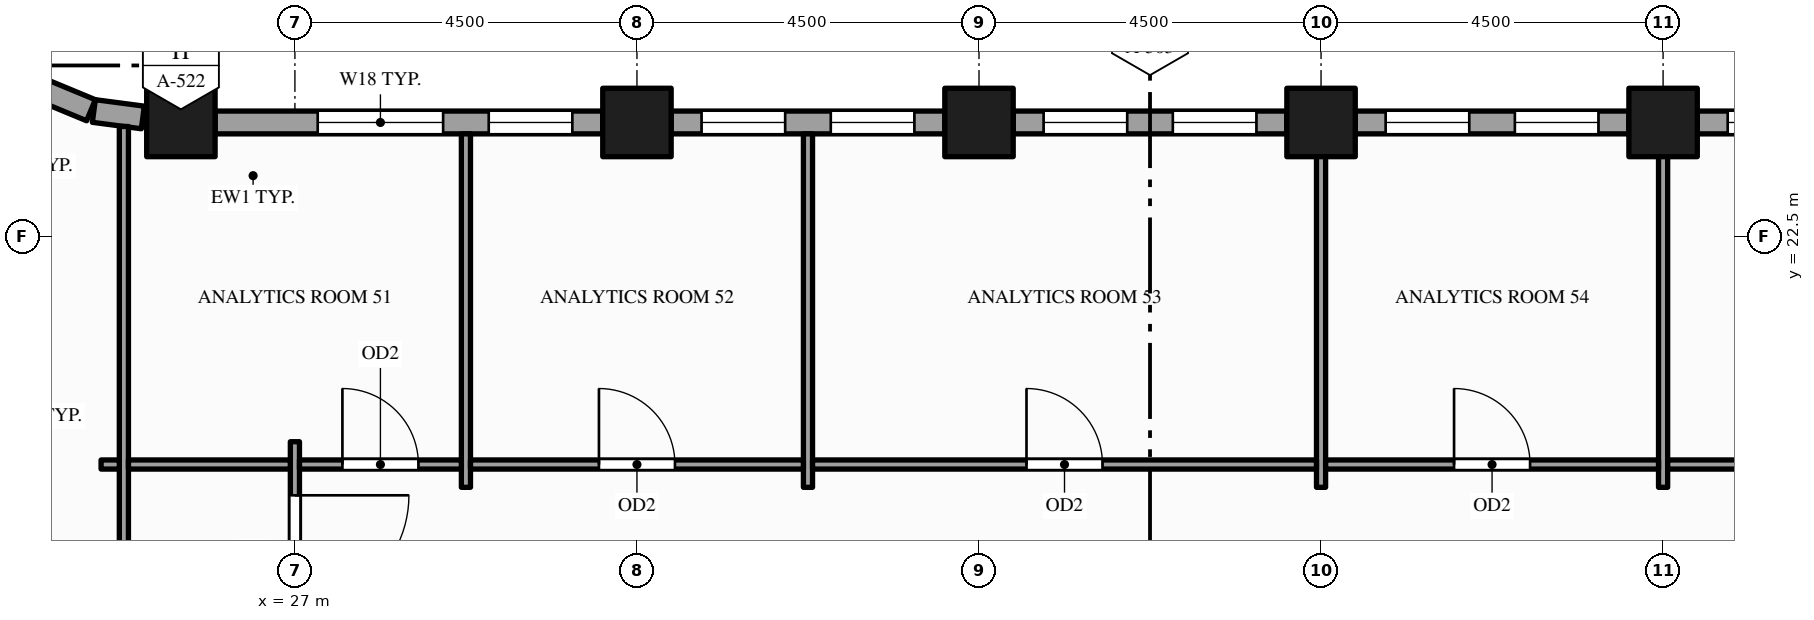
"""IFC4 building model, lengths in metres.
Left out: names, types, materials, properties, quantities, classifications, styles, units other than length and angle.
Written with IfcOpenShell. Run it as: python <this file> out.ifc"""

import sys

from ifc_helpers import new_model, si_unit, direction, frame, frame_2d, origin, origin_2d, place, context, subcontext, project, spatial, rectangle, hollow_rectangle, extrude, element, fill, save


model = new_model("IFC4")
c1 = context("Model", 3, precision=1e-05, world=origin(), true_north=direction((0.0, 1.0)))
c2 = subcontext(c1, "Body", "Model", "MODEL_VIEW")
j1 = project(units=[si_unit("LENGTHUNIT", "METRE"), si_unit("PLANEANGLEUNIT", "RADIAN")], contexts=[c1])
p1 = place(None, origin())
s1 = spatial("IfcSite", under=j1, at=p1, CompositionType="ELEMENT")
p2 = place(p1, origin())
s2 = spatial("IfcBuilding", under=s1, at=p2, CompositionType="ELEMENT")
p3 = place(p2, frame((0.0, 0.0, 159.0)))
s3 = spatial("IfcBuildingStorey", under=s2, at=p3, CompositionType="ELEMENT", Elevation=159.0)
for number, where, z_axis, x_axis in (
    (1, (25.5, 24.0, -0.15), (0.0, 0.0, 1.0), (1.0, 0.0, 0.0)),
    (2, (31.5, 24.0, -0.15), (0.0, 0.0, 1.0), (1.0, 0.0, 0.0)),
    (3, (36.0, 24.0, -0.15), (0.0, 0.0, 1.0), (1.0, 0.0, 0.0)),
    (4, (40.5, 24.0, -0.15), (0.0, 0.0, 1.0), (1.0, 0.0, 0.0)),
    (5, (45.0, 24.0, -0.15), (0.0, 0.0, 1.0), (1.0, 0.0, 0.0)),
):
    element("IfcColumn", number, at=place(p3, frame(where, z_axis=z_axis, x_axis=x_axis)), inside=s3, PredefinedType="COLUMN", context=c2, shape_type="SweptSolid", body=[
        extrude(hollow_rectangle(XDim=0.9, YDim=0.9, WallThickness=0.045, at=origin_2d()), origin(), (0.0, 0.0, 1.0), 4.0),
    ])
p4 = place(p3, frame((49.05, 24.0, 0.0), z_axis=(0.0, 0.0, 1.0), x_axis=(-1.0, 0.0, 0.0)))
e6 = element("IfcWall", 6, at=p4, inside=s3, PredefinedType="STANDARD", context=c2, shape_type="SweptSolid", body=[
    extrude(rectangle(XDim=3.6, YDim=0.3, at=frame_2d((1.8, 0.0))), origin(), (0.0, 0.0, 1.0), 2.87),
])
p5 = place(p4, frame((0.4, 0.0, 0.9)))
e7 = element("IfcOpeningElement", 7, at=p5, cuts=e6, PredefinedType="OPENING", context=c2, shape_type="SweptSolid", body=[
    extrude(rectangle(XDim=1.1, YDim=1.75, at=frame_2d((0.55, 0.875))), frame((0.0, 0.16, 0.0), z_axis=(0.0, -1.0, 0.0), x_axis=(1.0, 0.0, 0.0)), (0.0, 0.0, 1.0), 0.32),
])
p6 = place(p4, frame((2.1, 0.0, 0.9)))
e8 = element("IfcOpeningElement", 8, at=p6, cuts=e6, PredefinedType="OPENING", context=c2, shape_type="SweptSolid", body=[
    extrude(rectangle(XDim=1.1, YDim=1.75, at=frame_2d((0.55, 0.875))), frame((0.0, 0.16, 0.0), z_axis=(0.0, -1.0, 0.0), x_axis=(1.0, 0.0, 0.0)), (0.0, 0.0, 1.0), 0.32),
])
p7 = place(p3, frame((44.55, 24.0, 0.0), z_axis=(0.0, 0.0, 1.0), x_axis=(-1.0, 0.0, 0.0)))
e9 = element("IfcWall", 9, at=p7, inside=s3, PredefinedType="STANDARD", context=c2, shape_type="SweptSolid", body=[
    extrude(rectangle(XDim=3.6, YDim=0.3, at=frame_2d((1.8, 0.0))), origin(), (0.0, 0.0, 1.0), 2.87),
])
p8 = place(p7, frame((0.4, 0.0, 0.9)))
e10 = element("IfcOpeningElement", 10, at=p8, cuts=e9, PredefinedType="OPENING", context=c2, shape_type="SweptSolid", body=[
    extrude(rectangle(XDim=1.1, YDim=1.75, at=frame_2d((0.55, 0.875))), frame((0.0, 0.16, 0.0), z_axis=(0.0, -1.0, 0.0), x_axis=(1.0, 0.0, 0.0)), (0.0, 0.0, 1.0), 0.32),
])
p9 = place(p7, frame((2.1, 0.0, 0.9)))
e11 = element("IfcOpeningElement", 11, at=p9, cuts=e9, PredefinedType="OPENING", context=c2, shape_type="SweptSolid", body=[
    extrude(rectangle(XDim=1.1, YDim=1.75, at=frame_2d((0.55, 0.875))), frame((0.0, 0.16, 0.0), z_axis=(0.0, -1.0, 0.0), x_axis=(1.0, 0.0, 0.0)), (0.0, 0.0, 1.0), 0.32),
])
p10 = place(p3, frame((40.05, 24.0, 0.0), z_axis=(0.0, 0.0, 1.0), x_axis=(-1.0, 0.0, 0.0)))
e12 = element("IfcWall", 12, at=p10, inside=s3, PredefinedType="STANDARD", context=c2, shape_type="SweptSolid", body=[
    extrude(rectangle(XDim=3.6, YDim=0.3, at=frame_2d((1.8, 0.0))), origin(), (0.0, 0.0, 1.0), 2.87),
])
p11 = place(p10, frame((0.4, 0.0, 0.9)))
e13 = element("IfcOpeningElement", 13, at=p11, cuts=e12, PredefinedType="OPENING", context=c2, shape_type="SweptSolid", body=[
    extrude(rectangle(XDim=1.1, YDim=1.75, at=frame_2d((0.55, 0.875))), frame((0.0, 0.16, 0.0), z_axis=(0.0, -1.0, 0.0), x_axis=(1.0, 0.0, 0.0)), (0.0, 0.0, 1.0), 0.32),
])
p12 = place(p10, frame((2.1, 0.0, 0.9)))
e14 = element("IfcOpeningElement", 14, at=p12, cuts=e12, PredefinedType="OPENING", context=c2, shape_type="SweptSolid", body=[
    extrude(rectangle(XDim=1.1, YDim=1.75, at=frame_2d((0.55, 0.875))), frame((0.0, 0.16, 0.0), z_axis=(0.0, -1.0, 0.0), x_axis=(1.0, 0.0, 0.0)), (0.0, 0.0, 1.0), 0.32),
])
p13 = place(p3, frame((35.55, 24.0, 0.0), z_axis=(0.0, 0.0, 1.0), x_axis=(-1.0, 0.0, 0.0)))
e15 = element("IfcWall", 15, at=p13, inside=s3, PredefinedType="STANDARD", context=c2, shape_type="SweptSolid", body=[
    extrude(rectangle(XDim=3.6, YDim=0.3, at=frame_2d((1.8, 0.0))), origin(), (0.0, 0.0, 1.0), 2.87),
])
p14 = place(p13, frame((0.4, 0.0, 0.9)))
e16 = element("IfcOpeningElement", 16, at=p14, cuts=e15, PredefinedType="OPENING", context=c2, shape_type="SweptSolid", body=[
    extrude(rectangle(XDim=1.1, YDim=1.75, at=frame_2d((0.55, 0.875))), frame((0.0, 0.16, 0.0), z_axis=(0.0, -1.0, 0.0), x_axis=(1.0, 0.0, 0.0)), (0.0, 0.0, 1.0), 0.32),
])
p15 = place(p13, frame((2.1, 0.0, 0.9)))
e17 = element("IfcOpeningElement", 17, at=p15, cuts=e15, PredefinedType="OPENING", context=c2, shape_type="SweptSolid", body=[
    extrude(rectangle(XDim=1.1, YDim=1.75, at=frame_2d((0.55, 0.875))), frame((0.0, 0.16, 0.0), z_axis=(0.0, -1.0, 0.0), x_axis=(1.0, 0.0, 0.0)), (0.0, 0.0, 1.0), 0.32),
])
p16 = place(p3, frame((31.05, 24.0, 0.0), z_axis=(0.0, 0.0, 1.0), x_axis=(-1.0, 0.0, 0.0)))
e18 = element("IfcWall", 18, at=p16, inside=s3, PredefinedType="STANDARD", context=c2, shape_type="SweptSolid", body=[
    extrude(rectangle(XDim=5.1, YDim=0.3, at=frame_2d((2.55, 0.0))), origin(), (0.0, 0.0, 1.0), 2.87),
])
p17 = place(p16, frame((0.4, 0.0, 0.9)))
e19 = element("IfcOpeningElement", 19, at=p17, cuts=e18, PredefinedType="OPENING", context=c2, shape_type="SweptSolid", body=[
    extrude(rectangle(XDim=1.1, YDim=1.75, at=frame_2d((0.55, 0.875))), frame((0.0, 0.16, 0.0), z_axis=(0.0, -1.0, 0.0), x_axis=(1.0, 0.0, 0.0)), (0.0, 0.0, 1.0), 0.32),
])
p18 = place(p16, frame((2.1, 0.0, 0.9)))
e20 = element("IfcOpeningElement", 20, at=p18, cuts=e18, PredefinedType="OPENING", context=c2, shape_type="SweptSolid", body=[
    extrude(rectangle(XDim=1.65, YDim=1.75, at=frame_2d((0.825, 0.875))), frame((0.0, 0.16, 0.0), z_axis=(0.0, -1.0, 0.0), x_axis=(1.0, 0.0, 0.0)), (0.0, 0.0, 1.0), 0.32),
])
p19 = place(p3, frame((25.0, 24.066, 0.0), z_axis=(0.0, 0.0, 1.0), x_axis=(-0.991423590996, 0.130687655177, 0.0)))
e21 = element("IfcWall", 21, at=p19, inside=s3, PredefinedType="STANDARD", context=c2, shape_type="SweptSolid", body=[
    extrude(rectangle(XDim=0.65, YDim=0.3, at=frame_2d((0.325, 0.0))), origin(), (0.0, 0.0, 1.0), 2.87),
])
p20 = place(p3, frame((24.317, 24.161, 0.0), z_axis=(0.0, 0.0, 1.0), x_axis=(-0.923914616768, 0.382598720491, 0.0)))
e22 = element("IfcWall", 22, at=p20, inside=s3, PredefinedType="STANDARD", context=c2, shape_type="SweptSolid", body=[
    extrude(rectangle(XDim=1.135, YDim=0.3, at=frame_2d((0.568, 0.0))), origin(), (0.0, 0.0, 1.0), 3.149),
])
p21 = place(p3, frame((24.75, 1.65, 0.0), z_axis=(0.0, 0.0, 1.0), x_axis=(0.0, 1.0, 0.0)))
e23 = element("IfcWall", 23, at=p21, inside=s3, PredefinedType="PARTITIONING", context=c2, shape_type="SweptSolid", body=[
    extrude(rectangle(XDim=22.298, YDim=0.12, at=frame_2d((11.149, 0.0))), origin(), (0.0, 0.0, 1.0), 2.87),
])
p22 = place(p21, frame((7.725, 0.0, 0.0)))
e24 = element("IfcOpeningElement", 24, at=p22, cuts=e23, PredefinedType="OPENING", context=c2, shape_type="SweptSolid", body=[
    extrude(rectangle(XDim=1.5, YDim=2.1, at=frame_2d((0.75, 1.05))), frame((0.0, 0.07, 0.0), z_axis=(0.0, -1.0, 0.0), x_axis=(1.0, 0.0, 0.0)), (0.0, 0.0, 1.0), 0.14),
])
p23 = place(p21, frame((13.125, 0.0, 0.0)))
e25 = element("IfcOpeningElement", 25, at=p23, cuts=e23, PredefinedType="OPENING", context=c2, shape_type="SweptSolid", body=[
    extrude(rectangle(XDim=1.2, YDim=2.1, at=frame_2d((0.6, 1.05))), frame((0.0, 0.07, 0.0), z_axis=(0.0, -1.0, 0.0), x_axis=(1.0, 0.0, 0.0)), (0.0, 0.0, 1.0), 0.14),
])
p24 = place(p3, frame((27.0, 5.7, 0.0), z_axis=(0.0, 0.0, 1.0), x_axis=(0.0, 1.0, 0.0)))
e26 = element("IfcWall", 26, at=p24, inside=s3, PredefinedType="PARTITIONING", context=c2, shape_type="SweptSolid", body=[
    extrude(rectangle(XDim=14.1, YDim=0.12, at=frame_2d((7.05, 0.0))), origin(), (0.0, 0.0, 1.0), 2.87),
])
p25 = place(p24, frame((0.705, 0.0, 0.0)))
e27 = element("IfcOpeningElement", 27, at=p25, cuts=e26, PredefinedType="OPENING", context=c2, shape_type="SweptSolid", body=[
    extrude(rectangle(XDim=1.5, YDim=2.1, at=frame_2d((0.75, 1.05))), frame((0.0, 0.07, 0.0), z_axis=(0.0, -1.0, 0.0), x_axis=(1.0, 0.0, 0.0)), (0.0, 0.0, 1.0), 0.14),
])
p26 = place(p24, frame((11.895, 0.0, 0.0)))
e28 = element("IfcOpeningElement", 28, at=p26, cuts=e26, PredefinedType="OPENING", context=c2, shape_type="SweptSolid", body=[
    extrude(rectangle(XDim=1.5, YDim=2.1, at=frame_2d((0.75, 1.05))), frame((0.0, 0.07, 0.0), z_axis=(0.0, -1.0, 0.0), x_axis=(1.0, 0.0, 0.0)), (0.0, 0.0, 1.0), 0.14),
])
for number, where, z_axis, x_axis in (
    (29, (29.25, 19.2, 0.0), (0.0, 0.0, 1.0), (0.0, 1.0, 0.0)),
    (30, (33.75, 19.2, 0.0), (0.0, 0.0, 1.0), (0.0, 1.0, 0.0)),
    (31, (40.5, 19.2, 0.0), (0.0, 0.0, 1.0), (0.0, 1.0, 0.0)),
    (32, (45.0, 19.2, 0.0), (0.0, 0.0, 1.0), (0.0, 1.0, 0.0)),
):
    element("IfcWall", number, at=place(p3, frame(where, z_axis=z_axis, x_axis=x_axis)), inside=s3, PredefinedType="PARTITIONING", context=c2, shape_type="SweptSolid", body=[
        extrude(rectangle(XDim=4.65, YDim=0.12, at=frame_2d((2.325, 0.0))), origin(), (0.0, 0.0, 1.0), 2.87),
    ])
p27 = place(p3, frame((24.45, 19.5, 0.0), z_axis=(0.0, 0.0, 1.0), x_axis=(1.0, 0.0, 0.0)))
e33 = element("IfcWall", 33, at=p27, inside=s3, PredefinedType="PARTITIONING", context=c2, shape_type="SweptSolid", body=[
    extrude(rectangle(XDim=0.24, YDim=0.12, at=frame_2d((0.12, 0.0))), origin(), (0.0, 0.0, 1.0), 2.87),
])
p28 = place(p3, frame((24.81, 19.5, 0.0), z_axis=(0.0, 0.0, 1.0), x_axis=(1.0, 0.0, 0.0)))
e34 = element("IfcWall", 34, at=p28, inside=s3, PredefinedType="PARTITIONING", context=c2, shape_type="SweptSolid", body=[
    extrude(rectangle(XDim=2.13, YDim=0.12, at=frame_2d((1.065, 0.0))), origin(), (0.0, 0.0, 1.0), 2.87),
])
p29 = place(p3, frame((27.06, 19.5, 0.0), z_axis=(0.0, 0.0, 1.0), x_axis=(1.0, 0.0, 0.0)))
e35 = element("IfcWall", 35, at=p29, inside=s3, PredefinedType="PARTITIONING", context=c2, shape_type="SweptSolid", body=[
    extrude(rectangle(XDim=2.13, YDim=0.12, at=frame_2d((1.065, 0.0))), origin(), (0.0, 0.0, 1.0), 2.87),
])
p30 = place(p29, frame((0.565, 0.0, 0.0)))
e36 = element("IfcOpeningElement", 36, at=p30, cuts=e35, PredefinedType="OPENING", context=c2, shape_type="SweptSolid", body=[
    extrude(rectangle(XDim=1.0, YDim=2.1, at=frame_2d((0.5, 1.05))), frame((0.0, 0.07, 0.0), z_axis=(0.0, -1.0, 0.0), x_axis=(1.0, 0.0, 0.0)), (0.0, 0.0, 1.0), 0.14),
])
p31 = place(p3, frame((29.31, 19.5, 0.0), z_axis=(0.0, 0.0, 1.0), x_axis=(1.0, 0.0, 0.0)))
e37 = element("IfcWall", 37, at=p31, inside=s3, PredefinedType="PARTITIONING", context=c2, shape_type="SweptSolid", body=[
    extrude(rectangle(XDim=4.38, YDim=0.12, at=frame_2d((2.19, 0.0))), origin(), (0.0, 0.0, 1.0), 2.87),
])
p32 = place(p31, frame((1.69, 0.0, 0.0)))
e38 = element("IfcOpeningElement", 38, at=p32, cuts=e37, PredefinedType="OPENING", context=c2, shape_type="SweptSolid", body=[
    extrude(rectangle(XDim=1.0, YDim=2.1, at=frame_2d((0.5, 1.05))), frame((0.0, 0.07, 0.0), z_axis=(0.0, -1.0, 0.0), x_axis=(1.0, 0.0, 0.0)), (0.0, 0.0, 1.0), 0.14),
])
p33 = place(p3, frame((33.81, 19.5, 0.0), z_axis=(0.0, 0.0, 1.0), x_axis=(1.0, 0.0, 0.0)))
e39 = element("IfcWall", 39, at=p33, inside=s3, PredefinedType="PARTITIONING", context=c2, shape_type="SweptSolid", body=[
    extrude(rectangle(XDim=6.63, YDim=0.12, at=frame_2d((3.315, 0.0))), origin(), (0.0, 0.0, 1.0), 2.87),
])
p34 = place(p33, frame((2.815, 0.0, 0.0)))
e40 = element("IfcOpeningElement", 40, at=p34, cuts=e39, PredefinedType="OPENING", context=c2, shape_type="SweptSolid", body=[
    extrude(rectangle(XDim=1.0, YDim=2.1, at=frame_2d((0.5, 1.05))), frame((0.0, 0.07, 0.0), z_axis=(0.0, -1.0, 0.0), x_axis=(1.0, 0.0, 0.0)), (0.0, 0.0, 1.0), 0.14),
])
p35 = place(p3, frame((40.56, 19.5, 0.0), z_axis=(0.0, 0.0, 1.0), x_axis=(1.0, 0.0, 0.0)))
e41 = element("IfcWall", 41, at=p35, inside=s3, PredefinedType="PARTITIONING", context=c2, shape_type="SweptSolid", body=[
    extrude(rectangle(XDim=4.38, YDim=0.12, at=frame_2d((2.19, 0.0))), origin(), (0.0, 0.0, 1.0), 2.87),
])
p36 = place(p35, frame((1.69, 0.0, 0.0)))
e42 = element("IfcOpeningElement", 42, at=p36, cuts=e41, PredefinedType="OPENING", context=c2, shape_type="SweptSolid", body=[
    extrude(rectangle(XDim=1.0, YDim=2.1, at=frame_2d((0.5, 1.05))), frame((0.0, 0.07, 0.0), z_axis=(0.0, -1.0, 0.0), x_axis=(1.0, 0.0, 0.0)), (0.0, 0.0, 1.0), 0.14),
])
p37 = place(p3, frame((45.06, 19.5, 0.0), z_axis=(0.0, 0.0, 1.0), x_axis=(1.0, 0.0, 0.0)))
e43 = element("IfcWall", 43, at=p37, inside=s3, PredefinedType="PARTITIONING", context=c2, shape_type="SweptSolid", body=[
    extrude(rectangle(XDim=4.38, YDim=0.12, at=frame_2d((2.19, 0.0))), origin(), (0.0, 0.0, 1.0), 2.87),
])
p38 = place(p37, frame((1.69, 0.0, 0.0)))
e44 = element("IfcOpeningElement", 44, at=p38, cuts=e43, PredefinedType="OPENING", context=c2, shape_type="SweptSolid", body=[
    extrude(rectangle(XDim=1.0, YDim=2.1, at=frame_2d((0.5, 1.05))), frame((0.0, 0.07, 0.0), z_axis=(0.0, -1.0, 0.0), x_axis=(1.0, 0.0, 0.0)), (0.0, 0.0, 1.0), 0.14),
])
p39 = place(p6, origin())
e45 = element("IfcWindow", 45, at=p39, inside=s3, PartitioningType="SINGLE_PANEL", PredefinedType="WINDOW", context=c2, shape_type="SweptSolid", body=[
    extrude(rectangle(XDim=1.1, YDim=1.75, at=frame_2d((0.55, 0.875))), frame((0.0, 0.03, 0.0), z_axis=(0.0, -1.0, 0.0), x_axis=(1.0, 0.0, 0.0)), (0.0, 0.0, 1.0), 0.06),
])
fill(e8, e45)
p40 = place(p8, origin())
e46 = element("IfcWindow", 46, at=p40, inside=s3, PartitioningType="SINGLE_PANEL", PredefinedType="WINDOW", context=c2, shape_type="SweptSolid", body=[
    extrude(rectangle(XDim=1.1, YDim=1.75, at=frame_2d((0.55, 0.875))), frame((0.0, 0.03, 0.0), z_axis=(0.0, -1.0, 0.0), x_axis=(1.0, 0.0, 0.0)), (0.0, 0.0, 1.0), 0.06),
])
fill(e10, e46)
p41 = place(p9, origin())
e47 = element("IfcWindow", 47, at=p41, inside=s3, PartitioningType="SINGLE_PANEL", PredefinedType="WINDOW", context=c2, shape_type="SweptSolid", body=[
    extrude(rectangle(XDim=1.1, YDim=1.75, at=frame_2d((0.55, 0.875))), frame((0.0, 0.03, 0.0), z_axis=(0.0, -1.0, 0.0), x_axis=(1.0, 0.0, 0.0)), (0.0, 0.0, 1.0), 0.06),
])
fill(e11, e47)
p42 = place(p11, origin())
e48 = element("IfcWindow", 48, at=p42, inside=s3, PartitioningType="SINGLE_PANEL", PredefinedType="WINDOW", context=c2, shape_type="SweptSolid", body=[
    extrude(rectangle(XDim=1.1, YDim=1.75, at=frame_2d((0.55, 0.875))), frame((0.0, 0.03, 0.0), z_axis=(0.0, -1.0, 0.0), x_axis=(1.0, 0.0, 0.0)), (0.0, 0.0, 1.0), 0.06),
])
fill(e13, e48)
p43 = place(p12, origin())
e49 = element("IfcWindow", 49, at=p43, inside=s3, PartitioningType="SINGLE_PANEL", PredefinedType="WINDOW", context=c2, shape_type="SweptSolid", body=[
    extrude(rectangle(XDim=1.1, YDim=1.75, at=frame_2d((0.55, 0.875))), frame((0.0, 0.03, 0.0), z_axis=(0.0, -1.0, 0.0), x_axis=(1.0, 0.0, 0.0)), (0.0, 0.0, 1.0), 0.06),
])
fill(e14, e49)
p44 = place(p14, origin())
e50 = element("IfcWindow", 50, at=p44, inside=s3, PartitioningType="SINGLE_PANEL", PredefinedType="WINDOW", context=c2, shape_type="SweptSolid", body=[
    extrude(rectangle(XDim=1.1, YDim=1.75, at=frame_2d((0.55, 0.875))), frame((0.0, 0.03, 0.0), z_axis=(0.0, -1.0, 0.0), x_axis=(1.0, 0.0, 0.0)), (0.0, 0.0, 1.0), 0.06),
])
fill(e16, e50)
p45 = place(p15, origin())
e51 = element("IfcWindow", 51, at=p45, inside=s3, PartitioningType="SINGLE_PANEL", PredefinedType="WINDOW", context=c2, shape_type="SweptSolid", body=[
    extrude(rectangle(XDim=1.1, YDim=1.75, at=frame_2d((0.55, 0.875))), frame((0.0, 0.03, 0.0), z_axis=(0.0, -1.0, 0.0), x_axis=(1.0, 0.0, 0.0)), (0.0, 0.0, 1.0), 0.06),
])
fill(e17, e51)
p46 = place(p17, origin())
e52 = element("IfcWindow", 52, at=p46, inside=s3, PartitioningType="SINGLE_PANEL", PredefinedType="WINDOW", context=c2, shape_type="SweptSolid", body=[
    extrude(rectangle(XDim=1.1, YDim=1.75, at=frame_2d((0.55, 0.875))), frame((0.0, 0.03, 0.0), z_axis=(0.0, -1.0, 0.0), x_axis=(1.0, 0.0, 0.0)), (0.0, 0.0, 1.0), 0.06),
])
fill(e19, e52)
p47 = place(p18, origin())
e53 = element("IfcWindow", 53, at=p47, inside=s3, PartitioningType="SINGLE_PANEL", PredefinedType="WINDOW", context=c2, shape_type="SweptSolid", body=[
    extrude(rectangle(XDim=1.65, YDim=1.75, at=frame_2d((0.825, 0.875))), frame((0.0, 0.03, 0.0), z_axis=(0.0, -1.0, 0.0), x_axis=(1.0, 0.0, 0.0)), (0.0, 0.0, 1.0), 0.06),
])
fill(e20, e53)
p48 = place(p26, origin())
e54 = element("IfcDoor", 54, at=p48, inside=s3, OperationType="SINGLE_SWING_RIGHT", PredefinedType="DOOR", context=c2, shape_type="SweptSolid", body=[
    extrude(rectangle(XDim=1.5, YDim=2.1, at=frame_2d((0.75, 1.05))), frame((0.0, 0.025, 0.0), z_axis=(0.0, -1.0, 0.0), x_axis=(1.0, 0.0, 0.0)), (0.0, 0.0, 1.0), 0.05),
])
fill(e28, e54)
p49 = place(p30, origin())
e55 = element("IfcDoor", 55, at=p49, inside=s3, OperationType="SINGLE_SWING_LEFT", PredefinedType="DOOR", context=c2, shape_type="SweptSolid", body=[
    extrude(rectangle(XDim=1.0, YDim=2.1, at=frame_2d((0.5, 1.05))), frame((0.0, 0.025, 0.0), z_axis=(0.0, -1.0, 0.0), x_axis=(1.0, 0.0, 0.0)), (0.0, 0.0, 1.0), 0.05),
])
fill(e36, e55)
p50 = place(p32, origin())
e56 = element("IfcDoor", 56, at=p50, inside=s3, OperationType="SINGLE_SWING_LEFT", PredefinedType="DOOR", context=c2, shape_type="SweptSolid", body=[
    extrude(rectangle(XDim=1.0, YDim=2.1, at=frame_2d((0.5, 1.05))), frame((0.0, 0.025, 0.0), z_axis=(0.0, -1.0, 0.0), x_axis=(1.0, 0.0, 0.0)), (0.0, 0.0, 1.0), 0.05),
])
fill(e38, e56)
p51 = place(p34, origin())
e57 = element("IfcDoor", 57, at=p51, inside=s3, OperationType="SINGLE_SWING_LEFT", PredefinedType="DOOR", context=c2, shape_type="SweptSolid", body=[
    extrude(rectangle(XDim=1.0, YDim=2.1, at=frame_2d((0.5, 1.05))), frame((0.0, 0.025, 0.0), z_axis=(0.0, -1.0, 0.0), x_axis=(1.0, 0.0, 0.0)), (0.0, 0.0, 1.0), 0.05),
])
fill(e40, e57)
p52 = place(p36, origin())
e58 = element("IfcDoor", 58, at=p52, inside=s3, OperationType="SINGLE_SWING_LEFT", PredefinedType="DOOR", context=c2, shape_type="SweptSolid", body=[
    extrude(rectangle(XDim=1.0, YDim=2.1, at=frame_2d((0.5, 1.05))), frame((0.0, 0.025, 0.0), z_axis=(0.0, -1.0, 0.0), x_axis=(1.0, 0.0, 0.0)), (0.0, 0.0, 1.0), 0.05),
])
fill(e42, e58)
save(model, sys.argv[1])
